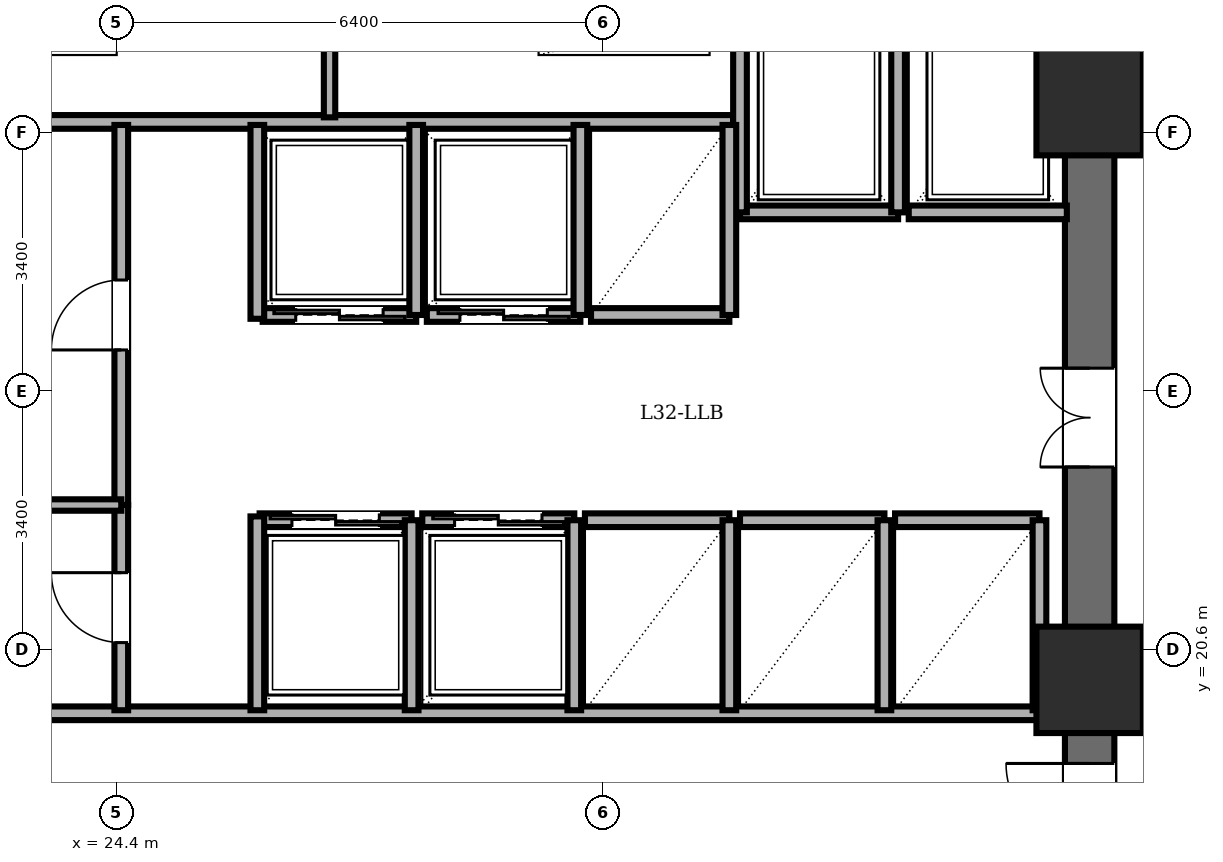
"""IFC4 building model, lengths in metres.
Left out: names, types, materials, properties, quantities, classifications, styles, units other than length and angle.
Written with IfcOpenShell. Run it as: python <this file> out.ifc"""

import sys

from ifc_helpers import new_model, si_unit, direction, frame, frame_2d, origin, origin_2d, place, context, subcontext, project, spatial, rectangle, extrude, element, fill, save


model = new_model("IFC4")
c1 = context("Model", 3, precision=1e-05, world=origin(), true_north=direction((0.0, 1.0)))
c2 = subcontext(c1, "Body", "Model", "MODEL_VIEW")
j1 = project(units=[si_unit("LENGTHUNIT", "METRE"), si_unit("PLANEANGLEUNIT", "RADIAN")], contexts=[c1])
p1 = place(None, origin())
s1 = spatial("IfcSite", under=j1, at=p1, CompositionType="ELEMENT")
p2 = place(p1, origin())
s2 = spatial("IfcBuilding", under=s1, at=p2, CompositionType="ELEMENT")
p3 = place(p2, frame((0.0, 0.0, 122.3)))
s3 = spatial("IfcBuildingStorey", under=s2, at=p3, CompositionType="ELEMENT", Elevation=122.3)
for number, where, z_axis, x_axis in (
    (1, (37.2, 20.2, 0.0), (0.0, 0.0, 1.0), (1.0, 0.0, 0.0)),
    (2, (37.2, 27.8, 0.0), (0.0, 0.0, 1.0), (1.0, 0.0, 0.0)),
):
    element("IfcColumn", number, at=place(p3, frame(where, z_axis=z_axis, x_axis=x_axis)), inside=s3, PredefinedType="COLUMN", context=c2, shape_type="SweptSolid", body=[
        extrude(rectangle(XDim=1.4, YDim=1.4, at=origin_2d()), origin(), (0.0, 0.0, 1.0), 3.6),
    ])
p4 = place(p3, frame((37.2, 14.4, 0.0), z_axis=(0.0, 0.0, 1.0), x_axis=(0.0, 1.0, 0.0)))
e3 = element("IfcWall", 3, at=p4, inside=s3, PredefinedType="SHEAR", context=c2, shape_type="SweptSolid", body=[
    extrude(rectangle(XDim=19.2, YDim=0.65, at=frame_2d((9.6, 0.0))), origin(), (0.0, 0.0, 1.0), 3.4),
])
p5 = place(p4, frame((15.8, 0.0, 0.0)))
e4 = element("IfcOpeningElement", 4, at=p5, cuts=e3, PredefinedType="OPENING", context=c2, shape_type="SweptSolid", body=[
    extrude(rectangle(XDim=1.15, YDim=2.15, at=frame_2d((0.575, 1.075))), frame((0.0, 0.335, 0.0), z_axis=(0.0, -1.0, 0.0), x_axis=(1.0, 0.0, 0.0)), (0.0, 0.0, 1.0), 0.67),
])
p6 = place(p4, frame((3.6, 0.0, 0.0)))
e5 = element("IfcOpeningElement", 5, at=p6, cuts=e3, PredefinedType="OPENING", context=c2, shape_type="SweptSolid", body=[
    extrude(rectangle(XDim=1.1, YDim=2.15, at=frame_2d((0.55, 1.075))), frame((0.0, 0.335, 0.0), z_axis=(0.0, -1.0, 0.0), x_axis=(1.0, 0.0, 0.0)), (0.0, 0.0, 1.0), 0.67),
])
p7 = place(p4, frame((8.6, 0.0, 0.0)))
e6 = element("IfcOpeningElement", 6, at=p7, cuts=e3, PredefinedType="OPENING", context=c2, shape_type="SweptSolid", body=[
    extrude(rectangle(XDim=1.3, YDim=2.2, at=frame_2d((0.65, 1.1))), frame((0.0, 0.335, 0.0), z_axis=(0.0, -1.0, 0.0), x_axis=(1.0, 0.0, 0.0)), (0.0, 0.0, 1.0), 0.67),
])
p8 = place(p3, frame((21.95, 27.54, 0.0), z_axis=(0.0, 0.0, 1.0), x_axis=(1.0, 0.0, 0.0)))
e7 = element("IfcWall", 7, at=p8, inside=s3, PredefinedType="PARTITIONING", context=c2, shape_type="SweptSolid", body=[
    extrude(rectangle(XDim=10.56, YDim=0.18, at=frame_2d((5.28, 0.0))), origin(), (0.0, 0.0, 1.0), 3.4),
])
p9 = place(p3, frame((27.2, 27.6, 0.0), z_axis=(0.0, 0.0, 1.0), x_axis=(0.0, 1.0, 0.0)))
e8 = element("IfcWall", 8, at=p9, inside=s3, PredefinedType="PARTITIONING", context=c2, shape_type="SweptSolid", body=[
    extrude(rectangle(XDim=1.52, YDim=0.15, at=frame_2d((0.76, 0.0))), origin(), (0.0, 0.0, 1.0), 3.4),
])
p10 = place(p3, frame((21.95, 19.76, 0.0), z_axis=(0.0, 0.0, 1.0), x_axis=(1.0, 0.0, 0.0)))
e9 = element("IfcWall", 9, at=p10, inside=s3, PredefinedType="PARTITIONING", context=c2, shape_type="SweptSolid", body=[
    extrude(rectangle(XDim=14.87, YDim=0.18, at=frame_2d((7.435, 0.0))), origin(), (0.0, 0.0, 1.0), 3.4),
])
p11 = place(p3, frame((34.68, 26.35, 0.0), z_axis=(0.0, 0.0, 1.0), x_axis=(-1.0, 0.0, 0.0)))
e10 = element("IfcWall", 10, at=p11, inside=s3, PredefinedType="PARTITIONING", context=c2, shape_type="SweptSolid", body=[
    extrude(rectangle(XDim=2.08, YDim=0.18, at=frame_2d((1.04, 0.0))), origin(), (0.0, 0.0, 1.0), 3.4),
])
for number, where, z_axis, x_axis in (
    (11, (34.68, 26.35, 0.0), (0.0, 0.0, 1.0), (0.0, 1.0, 0.0)),
    (12, (32.6, 29.08, 0.0), (0.0, 0.0, 1.0), (0.0, -1.0, 0.0)),
):
    element("IfcWall", number, at=place(p3, frame(where, z_axis=z_axis, x_axis=x_axis)), inside=s3, PredefinedType="PARTITIONING", context=c2, shape_type="SweptSolid", body=[
        extrude(rectangle(XDim=2.73, YDim=0.18, at=frame_2d((1.365, 0.0))), origin(), (0.0, 0.0, 1.0), 3.4),
    ])
p12 = place(p3, frame((36.9, 26.35, 0.0), z_axis=(0.0, 0.0, 1.0), x_axis=(-1.0, 0.0, 0.0)))
e13 = element("IfcWall", 13, at=p12, inside=s3, PredefinedType="PARTITIONING", context=c2, shape_type="SweptSolid", body=[
    extrude(rectangle(XDim=2.08, YDim=0.18, at=frame_2d((1.04, 0.0))), origin(), (0.0, 0.0, 1.0), 3.4),
])
p13 = place(p3, frame((28.34, 25.0, 0.0), z_axis=(0.0, 0.0, 1.0), x_axis=(-1.0, 0.0, 0.0)))
e14 = element("IfcWall", 14, at=p13, inside=s3, PredefinedType="PARTITIONING", context=c2, shape_type="SweptSolid", body=[
    extrude(rectangle(XDim=2.02, YDim=0.18, at=frame_2d((1.01, 0.0))), origin(), (0.0, 0.0, 1.0), 3.4),
])
p14 = place(p13, frame((0.435, 0.0, 0.0)))
e15 = element("IfcOpeningElement", 15, at=p14, cuts=e14, PredefinedType="OPENING", context=c2, shape_type="SweptSolid", body=[
    extrude(rectangle(XDim=1.15, YDim=2.2, at=frame_2d((0.575, 1.1))), frame((0.0, 0.1, 0.0), z_axis=(0.0, -1.0, 0.0), x_axis=(1.0, 0.0, 0.0)), (0.0, 0.0, 1.0), 0.2),
])
p15 = place(p3, frame((28.34, 25.0, 0.0), z_axis=(0.0, 0.0, 1.0), x_axis=(0.0, 1.0, 0.0)))
e16 = element("IfcWall", 16, at=p15, inside=s3, PredefinedType="PARTITIONING", context=c2, shape_type="SweptSolid", body=[
    extrude(rectangle(XDim=2.5, YDim=0.18, at=frame_2d((1.25, 0.0))), origin(), (0.0, 0.0, 1.0), 3.4),
])
p16 = place(p3, frame((30.5, 25.0, 0.0), z_axis=(0.0, 0.0, 1.0), x_axis=(-1.0, 0.0, 0.0)))
e17 = element("IfcWall", 17, at=p16, inside=s3, PredefinedType="PARTITIONING", context=c2, shape_type="SweptSolid", body=[
    extrude(rectangle(XDim=2.02, YDim=0.18, at=frame_2d((1.01, 0.0))), origin(), (0.0, 0.0, 1.0), 3.4),
])
p17 = place(p16, frame((0.435, 0.0, 0.0)))
e18 = element("IfcOpeningElement", 18, at=p17, cuts=e17, PredefinedType="OPENING", context=c2, shape_type="SweptSolid", body=[
    extrude(rectangle(XDim=1.15, YDim=2.2, at=frame_2d((0.575, 1.1))), frame((0.0, 0.1, 0.0), z_axis=(0.0, -1.0, 0.0), x_axis=(1.0, 0.0, 0.0)), (0.0, 0.0, 1.0), 0.2),
])
p18 = place(p3, frame((30.5, 25.0, 0.0), z_axis=(0.0, 0.0, 1.0), x_axis=(0.0, 1.0, 0.0)))
e19 = element("IfcWall", 19, at=p18, inside=s3, PredefinedType="PARTITIONING", context=c2, shape_type="SweptSolid", body=[
    extrude(rectangle(XDim=2.5, YDim=0.18, at=frame_2d((1.25, 0.0))), origin(), (0.0, 0.0, 1.0), 3.4),
])
p19 = place(p3, frame((26.28, 22.3, 0.0), z_axis=(0.0, 0.0, 1.0), x_axis=(1.0, 0.0, 0.0)))
e20 = element("IfcWall", 20, at=p19, inside=s3, PredefinedType="PARTITIONING", context=c2, shape_type="SweptSolid", body=[
    extrude(rectangle(XDim=2.0, YDim=0.18, at=frame_2d((1.0, 0.0))), origin(), (0.0, 0.0, 1.0), 3.4),
])
p20 = place(p19, frame((0.425, 0.0, 0.0)))
e21 = element("IfcOpeningElement", 21, at=p20, cuts=e20, PredefinedType="OPENING", context=c2, shape_type="SweptSolid", body=[
    extrude(rectangle(XDim=1.15, YDim=2.2, at=frame_2d((0.575, 1.1))), frame((0.0, 0.1, 0.0), z_axis=(0.0, -1.0, 0.0), x_axis=(1.0, 0.0, 0.0)), (0.0, 0.0, 1.0), 0.2),
])
p21 = place(p3, frame((28.28, 19.8, 0.0), z_axis=(0.0, 0.0, 1.0), x_axis=(0.0, 1.0, 0.0)))
e22 = element("IfcWall", 22, at=p21, inside=s3, PredefinedType="PARTITIONING", context=c2, shape_type="SweptSolid", body=[
    extrude(rectangle(XDim=2.5, YDim=0.18, at=frame_2d((1.25, 0.0))), origin(), (0.0, 0.0, 1.0), 3.4),
])
p22 = place(p3, frame((28.42, 22.3, 0.0), z_axis=(0.0, 0.0, 1.0), x_axis=(1.0, 0.0, 0.0)))
e23 = element("IfcWall", 23, at=p22, inside=s3, PredefinedType="PARTITIONING", context=c2, shape_type="SweptSolid", body=[
    extrude(rectangle(XDim=2.0, YDim=0.18, at=frame_2d((1.0, 0.0))), origin(), (0.0, 0.0, 1.0), 3.4),
])
p23 = place(p22, frame((0.425, 0.0, 0.0)))
e24 = element("IfcOpeningElement", 24, at=p23, cuts=e23, PredefinedType="OPENING", context=c2, shape_type="SweptSolid", body=[
    extrude(rectangle(XDim=1.15, YDim=2.2, at=frame_2d((0.575, 1.1))), frame((0.0, 0.1, 0.0), z_axis=(0.0, -1.0, 0.0), x_axis=(1.0, 0.0, 0.0)), (0.0, 0.0, 1.0), 0.2),
])
p24 = place(p3, frame((30.42, 19.8, 0.0), z_axis=(0.0, 0.0, 1.0), x_axis=(0.0, 1.0, 0.0)))
e25 = element("IfcWall", 25, at=p24, inside=s3, PredefinedType="PARTITIONING", context=c2, shape_type="SweptSolid", body=[
    extrude(rectangle(XDim=2.5, YDim=0.18, at=frame_2d((1.25, 0.0))), origin(), (0.0, 0.0, 1.0), 3.4),
])
p25 = place(p3, frame((32.46, 25.0, 0.0), z_axis=(0.0, 0.0, 1.0), x_axis=(-1.0, 0.0, 0.0)))
e26 = element("IfcWall", 26, at=p25, inside=s3, PredefinedType="PARTITIONING", context=c2, shape_type="SweptSolid", body=[
    extrude(rectangle(XDim=1.82, YDim=0.18, at=frame_2d((0.91, 0.0))), origin(), (0.0, 0.0, 1.0), 3.4),
])
p26 = place(p3, frame((32.46, 25.0, 0.0), z_axis=(0.0, 0.0, 1.0), x_axis=(0.0, 1.0, 0.0)))
e27 = element("IfcWall", 27, at=p26, inside=s3, PredefinedType="PARTITIONING", context=c2, shape_type="SweptSolid", body=[
    extrude(rectangle(XDim=2.5, YDim=0.18, at=frame_2d((1.25, 0.0))), origin(), (0.0, 0.0, 1.0), 3.4),
])
p27 = place(p3, frame((30.56, 22.3, 0.0), z_axis=(0.0, 0.0, 1.0), x_axis=(1.0, 0.0, 0.0)))
e28 = element("IfcWall", 28, at=p27, inside=s3, PredefinedType="PARTITIONING", context=c2, shape_type="SweptSolid", body=[
    extrude(rectangle(XDim=1.9, YDim=0.18, at=frame_2d((0.95, 0.0))), origin(), (0.0, 0.0, 1.0), 3.4),
])
p28 = place(p3, frame((32.46, 19.8, 0.0), z_axis=(0.0, 0.0, 1.0), x_axis=(0.0, 1.0, 0.0)))
e29 = element("IfcWall", 29, at=p28, inside=s3, PredefinedType="PARTITIONING", context=c2, shape_type="SweptSolid", body=[
    extrude(rectangle(XDim=2.5, YDim=0.18, at=frame_2d((1.25, 0.0))), origin(), (0.0, 0.0, 1.0), 3.4),
])
p29 = place(p3, frame((32.6, 22.3, 0.0), z_axis=(0.0, 0.0, 1.0), x_axis=(1.0, 0.0, 0.0)))
e30 = element("IfcWall", 30, at=p29, inside=s3, PredefinedType="PARTITIONING", context=c2, shape_type="SweptSolid", body=[
    extrude(rectangle(XDim=1.9, YDim=0.18, at=frame_2d((0.95, 0.0))), origin(), (0.0, 0.0, 1.0), 3.4),
])
p30 = place(p3, frame((34.5, 19.8, 0.0), z_axis=(0.0, 0.0, 1.0), x_axis=(0.0, 1.0, 0.0)))
e31 = element("IfcWall", 31, at=p30, inside=s3, PredefinedType="PARTITIONING", context=c2, shape_type="SweptSolid", body=[
    extrude(rectangle(XDim=2.5, YDim=0.18, at=frame_2d((1.25, 0.0))), origin(), (0.0, 0.0, 1.0), 3.4),
])
p31 = place(p3, frame((34.64, 22.3, 0.0), z_axis=(0.0, 0.0, 1.0), x_axis=(1.0, 0.0, 0.0)))
e32 = element("IfcWall", 32, at=p31, inside=s3, PredefinedType="PARTITIONING", context=c2, shape_type="SweptSolid", body=[
    extrude(rectangle(XDim=1.9, YDim=0.18, at=frame_2d((0.95, 0.0))), origin(), (0.0, 0.0, 1.0), 3.4),
])
p32 = place(p3, frame((36.54, 19.8, 0.0), z_axis=(0.0, 0.0, 1.0), x_axis=(0.0, 1.0, 0.0)))
e33 = element("IfcWall", 33, at=p32, inside=s3, PredefinedType="PARTITIONING", context=c2, shape_type="SweptSolid", body=[
    extrude(rectangle(XDim=2.5, YDim=0.18, at=frame_2d((1.25, 0.0))), origin(), (0.0, 0.0, 1.0), 3.4),
])
p33 = place(p3, frame((24.46, 22.5, 0.0), z_axis=(0.0, 0.0, 1.0), x_axis=(0.0, 1.0, 0.0)))
e34 = element("IfcWall", 34, at=p33, inside=s3, PredefinedType="PARTITIONING", context=c2, shape_type="SweptSolid", body=[
    extrude(rectangle(XDim=5.0, YDim=0.18, at=frame_2d((2.5, 0.0))), origin(), (0.0, 0.0, 1.0), 3.4),
])
p34 = place(p33, frame((2.04, 0.0, 0.0)))
e35 = element("IfcOpeningElement", 35, at=p34, cuts=e34, PredefinedType="OPENING", context=c2, shape_type="SweptSolid", body=[
    extrude(rectangle(XDim=0.92, YDim=2.1, at=frame_2d((0.46, 1.05))), frame((0.0, 0.1, 0.0), z_axis=(0.0, -1.0, 0.0), x_axis=(1.0, 0.0, 0.0)), (0.0, 0.0, 1.0), 0.2),
])
p35 = place(p3, frame((24.46, 19.8, 0.0), z_axis=(0.0, 0.0, 1.0), x_axis=(0.0, 1.0, 0.0)))
e36 = element("IfcWall", 36, at=p35, inside=s3, PredefinedType="PARTITIONING", context=c2, shape_type="SweptSolid", body=[
    extrude(rectangle(XDim=2.7, YDim=0.18, at=frame_2d((1.35, 0.0))), origin(), (0.0, 0.0, 1.0), 3.4),
])
p36 = place(p35, frame((0.89, 0.0, 0.0)))
e37 = element("IfcOpeningElement", 37, at=p36, cuts=e36, PredefinedType="OPENING", context=c2, shape_type="SweptSolid", body=[
    extrude(rectangle(XDim=0.92, YDim=2.1, at=frame_2d((0.46, 1.05))), frame((0.0, 0.1, 0.0), z_axis=(0.0, -1.0, 0.0), x_axis=(1.0, 0.0, 0.0)), (0.0, 0.0, 1.0), 0.2),
])
p37 = place(p3, frame((21.95, 22.5, 0.0), z_axis=(0.0, 0.0, 1.0), x_axis=(1.0, 0.0, 0.0)))
e38 = element("IfcWall", 38, at=p37, inside=s3, PredefinedType="PARTITIONING", context=c2, shape_type="SweptSolid", body=[
    extrude(rectangle(XDim=2.51, YDim=0.15, at=frame_2d((1.255, 0.0))), origin(), (0.0, 0.0, 1.0), 3.4),
])
for number, where, z_axis, x_axis in (
    (39, (26.25, 24.95, 0.0), (0.0, 0.0, 1.0), (0.0, 1.0, 0.0)),
    (40, (26.25, 19.8, 0.0), (0.0, 0.0, 1.0), (0.0, 1.0, 0.0)),
):
    element("IfcWall", number, at=place(p3, frame(where, z_axis=z_axis, x_axis=x_axis)), inside=s3, PredefinedType="PARTITIONING", context=c2, shape_type="SweptSolid", body=[
        extrude(rectangle(XDim=2.55, YDim=0.18, at=frame_2d((1.275, 0.0))), origin(), (0.0, 0.0, 1.0), 3.4),
    ])
p38 = place(p6, origin())
e41 = element("IfcDoor", 41, at=p38, inside=s3, OperationType="SINGLE_SWING_RIGHT", PredefinedType="DOOR", context=c2, shape_type="SweptSolid", body=[
    extrude(rectangle(XDim=1.1, YDim=2.15, at=frame_2d((0.55, 1.075))), frame((0.0, 0.025, 0.0), z_axis=(0.0, -1.0, 0.0), x_axis=(1.0, 0.0, 0.0)), (0.0, 0.0, 1.0), 0.05),
])
fill(e5, e41)
p39 = place(p14, origin())
e42 = element("IfcDoor", 42, at=p39, inside=s3, OperationType="DOUBLE_DOOR_SLIDING", PredefinedType="DOOR", context=c2, shape_type="SweptSolid", body=[
    extrude(rectangle(XDim=1.15, YDim=2.2, at=frame_2d((0.575, 1.1))), frame((0.0, 0.025, 0.0), z_axis=(0.0, -1.0, 0.0), x_axis=(1.0, 0.0, 0.0)), (0.0, 0.0, 1.0), 0.05),
])
fill(e15, e42)
p40 = place(p17, origin())
e43 = element("IfcDoor", 43, at=p40, inside=s3, OperationType="DOUBLE_DOOR_SLIDING", PredefinedType="DOOR", context=c2, shape_type="SweptSolid", body=[
    extrude(rectangle(XDim=1.15, YDim=2.2, at=frame_2d((0.575, 1.1))), frame((0.0, 0.025, 0.0), z_axis=(0.0, -1.0, 0.0), x_axis=(1.0, 0.0, 0.0)), (0.0, 0.0, 1.0), 0.05),
])
fill(e18, e43)
p41 = place(p20, origin())
e44 = element("IfcDoor", 44, at=p41, inside=s3, OperationType="DOUBLE_DOOR_SLIDING", PredefinedType="DOOR", context=c2, shape_type="SweptSolid", body=[
    extrude(rectangle(XDim=1.15, YDim=2.2, at=frame_2d((0.575, 1.1))), frame((0.0, 0.025, 0.0), z_axis=(0.0, -1.0, 0.0), x_axis=(1.0, 0.0, 0.0)), (0.0, 0.0, 1.0), 0.05),
])
fill(e21, e44)
p42 = place(p23, origin())
e45 = element("IfcDoor", 45, at=p42, inside=s3, OperationType="DOUBLE_DOOR_SLIDING", PredefinedType="DOOR", context=c2, shape_type="SweptSolid", body=[
    extrude(rectangle(XDim=1.15, YDim=2.2, at=frame_2d((0.575, 1.1))), frame((0.0, 0.025, 0.0), z_axis=(0.0, -1.0, 0.0), x_axis=(1.0, 0.0, 0.0)), (0.0, 0.0, 1.0), 0.05),
])
fill(e24, e45)
p43 = place(p34, origin())
e46 = element("IfcDoor", 46, at=p43, inside=s3, OperationType="SINGLE_SWING_LEFT", PredefinedType="DOOR", context=c2, shape_type="SweptSolid", body=[
    extrude(rectangle(XDim=0.92, YDim=2.1, at=frame_2d((0.46, 1.05))), frame((0.0, 0.025, 0.0), z_axis=(0.0, -1.0, 0.0), x_axis=(1.0, 0.0, 0.0)), (0.0, 0.0, 1.0), 0.05),
])
fill(e35, e46)
p44 = place(p36, origin())
e47 = element("IfcDoor", 47, at=p44, inside=s3, OperationType="SINGLE_SWING_RIGHT", PredefinedType="DOOR", context=c2, shape_type="SweptSolid", body=[
    extrude(rectangle(XDim=0.92, YDim=2.1, at=frame_2d((0.46, 1.05))), frame((0.0, 0.025, 0.0), z_axis=(0.0, -1.0, 0.0), x_axis=(1.0, 0.0, 0.0)), (0.0, 0.0, 1.0), 0.05),
])
fill(e37, e47)
p45 = place(p7, origin())
e48 = element("IfcDoor", 48, at=p45, inside=s3, OperationType="DOUBLE_DOOR_SINGLE_SWING", PredefinedType="DOOR", context=c2, shape_type="SweptSolid", body=[
    extrude(rectangle(XDim=1.3, YDim=2.2, at=frame_2d((0.65, 1.1))), frame((0.0, 0.025, 0.0), z_axis=(0.0, -1.0, 0.0), x_axis=(1.0, 0.0, 0.0)), (0.0, 0.0, 1.0), 0.05),
])
fill(e6, e48)
save(model, sys.argv[1])
